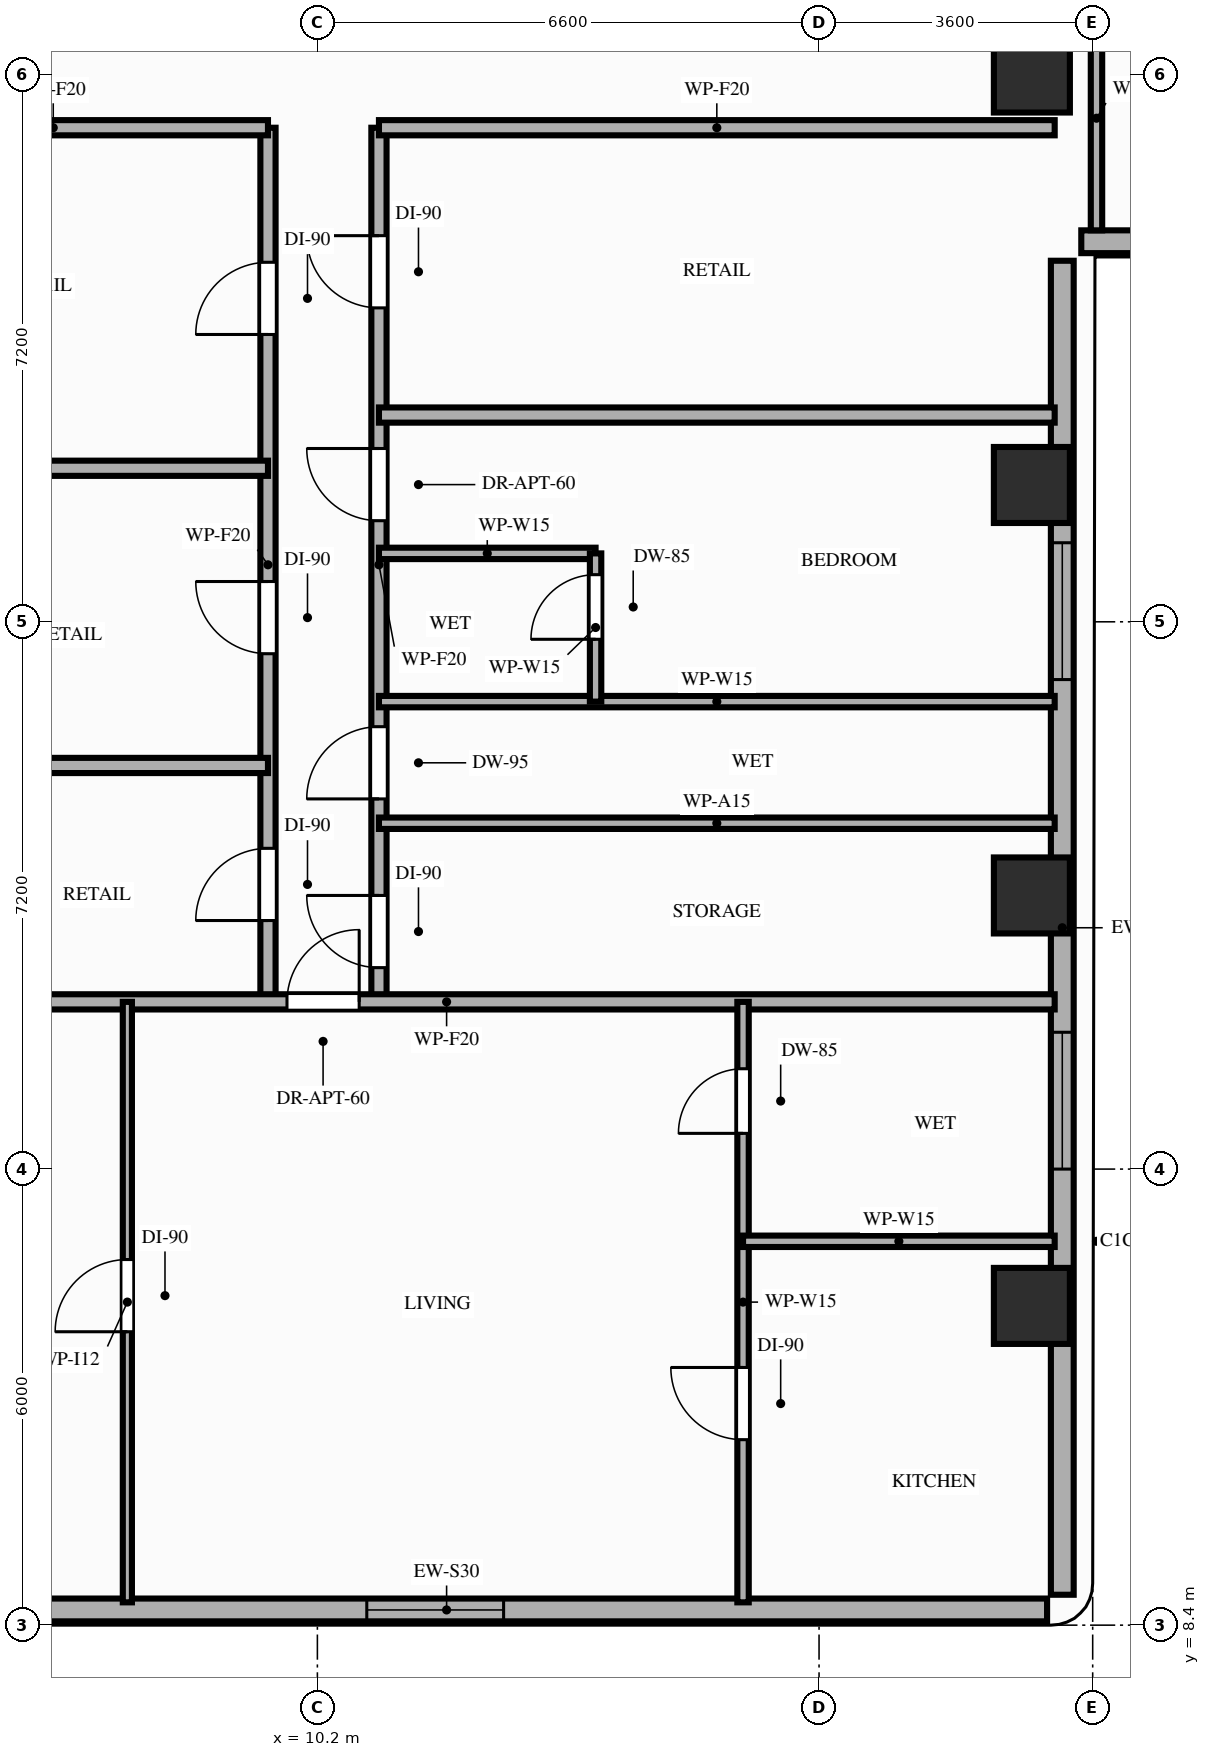
"""IFC4 building model, lengths in metres.
Left out: names, types, materials, properties, quantities, classifications, styles, units other than length and angle.
Written with IfcOpenShell. Run it as: python <this file> out.ifc"""

import sys

from ifc_helpers import new_model, si_unit, direction, frame, frame_2d, origin, origin_2d, place, context, subcontext, project, spatial, rectangle, extrude, element, fill, save


model = new_model("IFC4")
c1 = context("Model", 3, precision=1e-05, world=origin(), true_north=direction((0.0, 1.0)))
c2 = subcontext(c1, "Body", "Model", "MODEL_VIEW")
j1 = project(units=[si_unit("LENGTHUNIT", "METRE"), si_unit("PLANEANGLEUNIT", "RADIAN")], contexts=[c1])
p1 = place(None, origin())
s1 = spatial("IfcSite", under=j1, at=p1, CompositionType="ELEMENT")
p2 = place(p1, origin())
s2 = spatial("IfcBuilding", under=s1, at=p2, CompositionType="ELEMENT")
p3 = place(p2, frame((0.0, 0.0, 117.0)))
s3 = spatial("IfcBuildingStorey", under=s2, at=p3, CompositionType="ELEMENT", Elevation=117.0)
for number, where, z_axis, x_axis in (
    (1, (19.6, 12.6, 0.0), (0.0, 0.0, 1.0), (1.0, 0.0, 0.0)),
    (2, (19.6, 18.0, 0.0), (0.0, 0.0, 1.0), (1.0, 0.0, 0.0)),
    (3, (19.6, 23.4, 0.0), (0.0, 0.0, 1.0), (1.0, 0.0, 0.0)),
    (4, (19.6, 28.8, 0.0), (0.0, 0.0, 1.0), (1.0, 0.0, 0.0)),
):
    element("IfcColumn", number, at=place(p3, frame(where, z_axis=z_axis, x_axis=x_axis)), inside=s3, PredefinedType="COLUMN", context=c2, shape_type="SweptSolid", body=[
        extrude(rectangle(XDim=1.0, YDim=1.0, at=origin_2d()), origin(), (0.0, 0.0, 1.0), 3.2),
    ])
p4 = place(p3, frame((4.0, 8.6, 0.0), z_axis=(0.0, 0.0, 1.0), x_axis=(1.0, 0.0, 0.0)))
e5 = element("IfcWall", 5, at=p4, inside=s3, PredefinedType="STANDARD", context=c2, shape_type="SweptSolid", body=[
    extrude(rectangle(XDim=15.8, YDim=0.3, at=frame_2d((7.9, 0.0))), origin(), (0.0, 0.0, 1.0), 3.02),
])
p5 = place(p4, frame((6.85, 0.0, 0.85)))
e6 = element("IfcOpeningElement", 6, at=p5, cuts=e5, PredefinedType="OPENING", context=c2, shape_type="SweptSolid", body=[
    extrude(rectangle(XDim=1.8, YDim=1.75, at=frame_2d((0.9, 0.875))), frame((0.0, 0.16, 0.0), z_axis=(0.0, -1.0, 0.0), x_axis=(1.0, 0.0, 0.0)), (0.0, 0.0, 1.0), 0.32),
])
p6 = place(p3, frame((20.0, 8.8, 0.0), z_axis=(0.0, 0.0, 1.0), x_axis=(0.0, 1.0, 0.0)))
e7 = element("IfcWall", 7, at=p6, inside=s3, PredefinedType="STANDARD", context=c2, shape_type="SweptSolid", body=[
    extrude(rectangle(XDim=17.55, YDim=0.3, at=frame_2d((8.775, 0.0))), origin(), (0.0, 0.0, 1.0), 2.41),
])
p7 = place(p6, frame((12.04, 0.0, 0.85)))
e8 = element("IfcOpeningElement", 8, at=p7, cuts=e7, PredefinedType="OPENING", context=c2, shape_type="SweptSolid", body=[
    extrude(rectangle(XDim=1.8, YDim=1.31, at=frame_2d((0.9, 0.655))), frame((0.0, 0.16, 0.0), z_axis=(0.0, -1.0, 0.0), x_axis=(1.0, 0.0, 0.0)), (0.0, 0.0, 1.0), 0.32),
])
p8 = place(p6, frame((5.6, 0.0, 0.85)))
e9 = element("IfcOpeningElement", 9, at=p8, cuts=e7, PredefinedType="OPENING", context=c2, shape_type="SweptSolid", body=[
    extrude(rectangle(XDim=1.8, YDim=1.31, at=frame_2d((0.9, 0.655))), frame((0.0, 0.16, 0.0), z_axis=(0.0, -1.0, 0.0), x_axis=(1.0, 0.0, 0.0)), (0.0, 0.0, 1.0), 0.32),
])
p9 = place(p3, frame((20.25, 26.6, 0.0), z_axis=(0.0, 0.0, 1.0), x_axis=(1.0, 0.0, 0.0)))
e10 = element("IfcWall", 10, at=p9, inside=s3, PredefinedType="STANDARD", context=c2, shape_type="SweptSolid", body=[
    extrude(rectangle(XDim=26.15, YDim=0.3, at=frame_2d((13.075, 0.0))), origin(), (0.0, 0.0, 1.0), 2.7),
])
p10 = place(p9, frame((8.0, 0.0, 0.0)))
e11 = element("IfcOpeningElement", 11, at=p10, cuts=e10, PredefinedType="OPENING", context=c2, shape_type="SweptSolid", body=[
    extrude(rectangle(XDim=1.3, YDim=2.08, at=frame_2d((0.65, 1.04))), frame((0.0, 0.16, 0.0), z_axis=(0.0, -1.0, 0.0), x_axis=(1.0, 0.0, 0.0)), (0.0, 0.0, 1.0), 0.32),
])
p11 = place(p9, frame((22.5, 0.0, 0.0)))
e12 = element("IfcOpeningElement", 12, at=p11, cuts=e10, PredefinedType="OPENING", context=c2, shape_type="SweptSolid", body=[
    extrude(rectangle(XDim=1.3, YDim=2.08, at=frame_2d((0.65, 1.04))), frame((0.0, 0.16, 0.0), z_axis=(0.0, -1.0, 0.0), x_axis=(1.0, 0.0, 0.0)), (0.0, 0.0, 1.0), 0.32),
])
p12 = place(p9, frame((2.25, 0.0, 0.85)))
e13 = element("IfcOpeningElement", 13, at=p12, cuts=e10, PredefinedType="OPENING", context=c2, shape_type="SweptSolid", body=[
    extrude(rectangle(XDim=1.8, YDim=1.6, at=frame_2d((0.9, 0.8))), frame((0.0, 0.16, 0.0), z_axis=(0.0, -1.0, 0.0), x_axis=(1.0, 0.0, 0.0)), (0.0, 0.0, 1.0), 0.32),
])
p13 = place(p3, frame((9.55, 16.6, 0.0), z_axis=(0.0, 0.0, 1.0), x_axis=(0.0, 1.0, 0.0)))
e14 = element("IfcWall", 14, at=p13, inside=s3, PredefinedType="PARTITIONING", context=c2, shape_type="SweptSolid", body=[
    extrude(rectangle(XDim=11.5, YDim=0.2, at=frame_2d((5.75, 0.0))), origin(), (0.0, 0.0, 1.0), 2.41),
])
p14 = place(p13, frame((1.07, 0.0, 0.0)))
e15 = element("IfcOpeningElement", 15, at=p14, cuts=e14, PredefinedType="OPENING", context=c2, shape_type="SweptSolid", body=[
    extrude(rectangle(XDim=0.95, YDim=2.15, at=frame_2d((0.475, 1.075))), frame((0.0, 0.11, 0.0), z_axis=(0.0, -1.0, 0.0), x_axis=(1.0, 0.0, 0.0)), (0.0, 0.0, 1.0), 0.22),
])
p15 = place(p13, frame((4.58, 0.0, 0.0)))
e16 = element("IfcOpeningElement", 16, at=p15, cuts=e14, PredefinedType="OPENING", context=c2, shape_type="SweptSolid", body=[
    extrude(rectangle(XDim=0.95, YDim=2.15, at=frame_2d((0.475, 1.075))), frame((0.0, 0.11, 0.0), z_axis=(0.0, -1.0, 0.0), x_axis=(1.0, 0.0, 0.0)), (0.0, 0.0, 1.0), 0.22),
])
p16 = place(p13, frame((8.78, 0.0, 0.0)))
e17 = element("IfcOpeningElement", 17, at=p16, cuts=e14, PredefinedType="OPENING", context=c2, shape_type="SweptSolid", body=[
    extrude(rectangle(XDim=0.95, YDim=2.15, at=frame_2d((0.475, 1.075))), frame((0.0, 0.11, 0.0), z_axis=(0.0, -1.0, 0.0), x_axis=(1.0, 0.0, 0.0)), (0.0, 0.0, 1.0), 0.22),
])
p17 = place(p3, frame((11.01, 16.6, 0.0), z_axis=(0.0, 0.0, 1.0), x_axis=(0.0, 1.0, 0.0)))
e18 = element("IfcWall", 18, at=p17, inside=s3, PredefinedType="PARTITIONING", context=c2, shape_type="SweptSolid", body=[
    extrude(rectangle(XDim=11.5, YDim=0.2, at=frame_2d((5.75, 0.0))), origin(), (0.0, 0.0, 1.0), 2.41),
])
p18 = place(p17, frame((0.45, 0.0, 0.0)))
e19 = element("IfcOpeningElement", 19, at=p18, cuts=e18, PredefinedType="OPENING", context=c2, shape_type="SweptSolid", body=[
    extrude(rectangle(XDim=0.95, YDim=2.15, at=frame_2d((0.475, 1.075))), frame((0.0, 0.11, 0.0), z_axis=(0.0, -1.0, 0.0), x_axis=(1.0, 0.0, 0.0)), (0.0, 0.0, 1.0), 0.22),
])
p19 = place(p17, frame((2.67, 0.0, 0.0)))
e20 = element("IfcOpeningElement", 20, at=p19, cuts=e18, PredefinedType="OPENING", context=c2, shape_type="SweptSolid", body=[
    extrude(rectangle(XDim=0.95, YDim=2.1, at=frame_2d((0.475, 1.05))), frame((0.0, 0.11, 0.0), z_axis=(0.0, -1.0, 0.0), x_axis=(1.0, 0.0, 0.0)), (0.0, 0.0, 1.0), 0.22),
])
p20 = place(p17, frame((9.13, 0.0, 0.0)))
e21 = element("IfcOpeningElement", 21, at=p20, cuts=e18, PredefinedType="OPENING", context=c2, shape_type="SweptSolid", body=[
    extrude(rectangle(XDim=0.95, YDim=2.15, at=frame_2d((0.475, 1.075))), frame((0.0, 0.11, 0.0), z_axis=(0.0, -1.0, 0.0), x_axis=(1.0, 0.0, 0.0)), (0.0, 0.0, 1.0), 0.22),
])
p21 = place(p17, frame((6.33, 0.0, 0.0)))
e22 = element("IfcOpeningElement", 22, at=p21, cuts=e18, PredefinedType="OPENING", context=c2, shape_type="SweptSolid", body=[
    extrude(rectangle(XDim=0.95, YDim=2.15, at=frame_2d((0.475, 1.075))), frame((0.0, 0.11, 0.0), z_axis=(0.0, -1.0, 0.0), x_axis=(1.0, 0.0, 0.0)), (0.0, 0.0, 1.0), 0.22),
])
p22 = place(p3, frame((3.9, 16.6, 0.0), z_axis=(0.0, 0.0, 1.0), x_axis=(1.0, 0.0, 0.0)))
e23 = element("IfcWall", 23, at=p22, inside=s3, PredefinedType="PARTITIONING", context=c2, shape_type="SweptSolid", body=[
    extrude(rectangle(XDim=16.0, YDim=0.2, at=frame_2d((8.0, 0.0))), origin(), (0.0, 0.0, 1.0), 2.41),
])
p23 = place(p22, frame((5.9, 0.0, 0.0)))
e24 = element("IfcOpeningElement", 24, at=p23, cuts=e23, PredefinedType="OPENING", context=c2, shape_type="SweptSolid", body=[
    extrude(rectangle(XDim=0.95, YDim=2.15, at=frame_2d((0.475, 1.075))), frame((0.0, 0.11, 0.0), z_axis=(0.0, -1.0, 0.0), x_axis=(1.0, 0.0, 0.0)), (0.0, 0.0, 1.0), 0.22),
])
p24 = place(p3, frame((3.9, 28.1, 0.0), z_axis=(0.0, 0.0, 1.0), x_axis=(1.0, 0.0, 0.0)))
e25 = element("IfcWall", 25, at=p24, inside=s3, PredefinedType="PARTITIONING", context=c2, shape_type="SweptSolid", body=[
    extrude(rectangle(XDim=5.65, YDim=0.2, at=frame_2d((2.825, 0.0))), origin(), (0.0, 0.0, 1.0), 2.41),
])
p25 = place(p3, frame((11.01, 28.1, 0.0), z_axis=(0.0, 0.0, 1.0), x_axis=(1.0, 0.0, 0.0)))
e26 = element("IfcWall", 26, at=p25, inside=s3, PredefinedType="PARTITIONING", context=c2, shape_type="SweptSolid", body=[
    extrude(rectangle(XDim=8.89, YDim=0.2, at=frame_2d((4.445, 0.0))), origin(), (0.0, 0.0, 1.0), 2.41),
])
p26 = place(p3, frame((20.45, 26.75, 0.0), z_axis=(0.0, 0.0, 1.0), x_axis=(0.0, 1.0, 0.0)))
e27 = element("IfcWall", 27, at=p26, inside=s3, PredefinedType="PARTITIONING", context=c2, shape_type="SweptSolid", body=[
    extrude(rectangle(XDim=2.95, YDim=0.15, at=frame_2d((1.475, 0.0))), origin(), (0.0, 0.0, 1.0), 2.41),
])
for number, where, z_axis, x_axis in (
    (28, (3.9, 19.71, 0.0), (0.0, 0.0, 1.0), (1.0, 0.0, 0.0)),
    (29, (3.9, 23.62, 0.0), (0.0, 0.0, 1.0), (1.0, 0.0, 0.0)),
):
    element("IfcWall", number, at=place(p3, frame(where, z_axis=z_axis, x_axis=x_axis)), inside=s3, PredefinedType="PARTITIONING", context=c2, shape_type="SweptSolid", body=[
        extrude(rectangle(XDim=5.65, YDim=0.2, at=frame_2d((2.825, 0.0))), origin(), (0.0, 0.0, 1.0), 2.41),
    ])
p27 = place(p3, frame((7.7, 8.7, 0.0), z_axis=(0.0, 0.0, 1.0), x_axis=(0.0, 1.0, 0.0)))
e30 = element("IfcWall", 30, at=p27, inside=s3, PredefinedType="PARTITIONING", context=c2, shape_type="SweptSolid", body=[
    extrude(rectangle(XDim=7.9, YDim=0.12, at=frame_2d((3.95, 0.0))), origin(), (0.0, 0.0, 1.0), 2.41),
])
p28 = place(p27, frame((3.56, 0.0, 0.0)))
e31 = element("IfcOpeningElement", 31, at=p28, cuts=e30, PredefinedType="OPENING", context=c2, shape_type="SweptSolid", body=[
    extrude(rectangle(XDim=0.95, YDim=2.15, at=frame_2d((0.475, 1.075))), frame((0.0, 0.07, 0.0), z_axis=(0.0, -1.0, 0.0), x_axis=(1.0, 0.0, 0.0)), (0.0, 0.0, 1.0), 0.14),
])
p29 = place(p3, frame((15.8, 8.7, 0.0), z_axis=(0.0, 0.0, 1.0), x_axis=(0.0, 1.0, 0.0)))
e32 = element("IfcWall", 32, at=p29, inside=s3, PredefinedType="PARTITIONING", context=c2, shape_type="SweptSolid", body=[
    extrude(rectangle(XDim=7.9, YDim=0.15, at=frame_2d((3.95, 0.0))), origin(), (0.0, 0.0, 1.0), 2.41),
])
p30 = place(p29, frame((2.14, 0.0, 0.0)))
e33 = element("IfcOpeningElement", 33, at=p30, cuts=e32, PredefinedType="OPENING", context=c2, shape_type="SweptSolid", body=[
    extrude(rectangle(XDim=0.95, YDim=2.15, at=frame_2d((0.475, 1.075))), frame((0.0, 0.085, 0.0), z_axis=(0.0, -1.0, 0.0), x_axis=(1.0, 0.0, 0.0)), (0.0, 0.0, 1.0), 0.17),
])
p31 = place(p29, frame((6.17, 0.0, 0.0)))
e34 = element("IfcOpeningElement", 34, at=p31, cuts=e32, PredefinedType="OPENING", context=c2, shape_type="SweptSolid", body=[
    extrude(rectangle(XDim=0.85, YDim=2.1, at=frame_2d((0.425, 1.05))), frame((0.0, 0.085, 0.0), z_axis=(0.0, -1.0, 0.0), x_axis=(1.0, 0.0, 0.0)), (0.0, 0.0, 1.0), 0.17),
])
p32 = place(p3, frame((15.8, 13.45, 0.0), z_axis=(0.0, 0.0, 1.0), x_axis=(1.0, 0.0, 0.0)))
e35 = element("IfcWall", 35, at=p32, inside=s3, PredefinedType="PARTITIONING", context=c2, shape_type="SweptSolid", body=[
    extrude(rectangle(XDim=4.1, YDim=0.15, at=frame_2d((2.05, 0.0))), origin(), (0.0, 0.0, 1.0), 2.41),
])
for number, where, z_axis, x_axis in (
    (36, (11.01, 18.95, 0.0), (0.0, 0.0, 1.0), (1.0, 0.0, 0.0)),
    (37, (11.01, 20.55, 0.0), (0.0, 0.0, 1.0), (1.0, 0.0, 0.0)),
):
    element("IfcWall", number, at=place(p3, frame(where, z_axis=z_axis, x_axis=x_axis)), inside=s3, PredefinedType="PARTITIONING", context=c2, shape_type="SweptSolid", body=[
        extrude(rectangle(XDim=8.89, YDim=0.15, at=frame_2d((4.445, 0.0))), origin(), (0.0, 0.0, 1.0), 2.41),
    ])
p33 = place(p3, frame((11.01, 24.32, 0.0), z_axis=(0.0, 0.0, 1.0), x_axis=(1.0, 0.0, 0.0)))
e38 = element("IfcWall", 38, at=p33, inside=s3, PredefinedType="PARTITIONING", context=c2, shape_type="SweptSolid", body=[
    extrude(rectangle(XDim=8.89, YDim=0.2, at=frame_2d((4.445, 0.0))), origin(), (0.0, 0.0, 1.0), 2.41),
])
p34 = place(p3, frame((11.01, 22.5, 0.0), z_axis=(0.0, 0.0, 1.0), x_axis=(1.0, 0.0, 0.0)))
e39 = element("IfcWall", 39, at=p34, inside=s3, PredefinedType="PARTITIONING", context=c2, shape_type="SweptSolid", body=[
    extrude(rectangle(XDim=2.85, YDim=0.15, at=frame_2d((1.425, 0.0))), origin(), (0.0, 0.0, 1.0), 3.02),
])
p35 = place(p3, frame((13.86, 20.55, 0.0), z_axis=(0.0, 0.0, 1.0), x_axis=(0.0, 1.0, 0.0)))
e40 = element("IfcWall", 40, at=p35, inside=s3, PredefinedType="PARTITIONING", context=c2, shape_type="SweptSolid", body=[
    extrude(rectangle(XDim=1.95, YDim=0.15, at=frame_2d((0.975, 0.0))), origin(), (0.0, 0.0, 1.0), 2.6),
])
p36 = place(p35, frame((0.82, 0.0, 0.0)))
e41 = element("IfcOpeningElement", 41, at=p36, cuts=e40, PredefinedType="OPENING", context=c2, shape_type="SweptSolid", body=[
    extrude(rectangle(XDim=0.85, YDim=2.1, at=frame_2d((0.425, 1.05))), frame((0.0, 0.085, 0.0), z_axis=(0.0, -1.0, 0.0), x_axis=(1.0, 0.0, 0.0)), (0.0, 0.0, 1.0), 0.17),
])
p37 = place(p5, origin())
e42 = element("IfcWindow", 42, at=p37, inside=s3, PartitioningType="SINGLE_PANEL", PredefinedType="WINDOW", context=c2, shape_type="SweptSolid", body=[
    extrude(rectangle(XDim=1.8, YDim=1.75, at=frame_2d((0.9, 0.875))), frame((0.0, 0.03, 0.0), z_axis=(0.0, -1.0, 0.0), x_axis=(1.0, 0.0, 0.0)), (0.0, 0.0, 1.0), 0.06),
])
fill(e6, e42)
p38 = place(p7, origin())
e43 = element("IfcWindow", 43, at=p38, inside=s3, PartitioningType="SINGLE_PANEL", PredefinedType="WINDOW", context=c2, shape_type="SweptSolid", body=[
    extrude(rectangle(XDim=1.8, YDim=1.31, at=frame_2d((0.9, 0.655))), frame((0.0, 0.03, 0.0), z_axis=(0.0, -1.0, 0.0), x_axis=(1.0, 0.0, 0.0)), (0.0, 0.0, 1.0), 0.06),
])
fill(e8, e43)
p39 = place(p8, origin())
e44 = element("IfcWindow", 44, at=p39, inside=s3, PartitioningType="SINGLE_PANEL", PredefinedType="WINDOW", context=c2, shape_type="SweptSolid", body=[
    extrude(rectangle(XDim=1.8, YDim=1.31, at=frame_2d((0.9, 0.655))), frame((0.0, 0.03, 0.0), z_axis=(0.0, -1.0, 0.0), x_axis=(1.0, 0.0, 0.0)), (0.0, 0.0, 1.0), 0.06),
])
fill(e9, e44)
p40 = place(p14, origin())
e45 = element("IfcDoor", 45, at=p40, inside=s3, OperationType="SINGLE_SWING_LEFT", PredefinedType="DOOR", context=c2, shape_type="SweptSolid", body=[
    extrude(rectangle(XDim=0.95, YDim=2.15, at=frame_2d((0.475, 1.075))), frame((0.0, 0.025, 0.0), z_axis=(0.0, -1.0, 0.0), x_axis=(1.0, 0.0, 0.0)), (0.0, 0.0, 1.0), 0.05),
])
fill(e15, e45)
p41 = place(p15, origin())
e46 = element("IfcDoor", 46, at=p41, inside=s3, OperationType="SINGLE_SWING_RIGHT", PredefinedType="DOOR", context=c2, shape_type="SweptSolid", body=[
    extrude(rectangle(XDim=0.95, YDim=2.15, at=frame_2d((0.475, 1.075))), frame((0.0, 0.025, 0.0), z_axis=(0.0, -1.0, 0.0), x_axis=(1.0, 0.0, 0.0)), (0.0, 0.0, 1.0), 0.05),
])
fill(e16, e46)
p42 = place(p16, origin())
e47 = element("IfcDoor", 47, at=p42, inside=s3, OperationType="SINGLE_SWING_LEFT", PredefinedType="DOOR", context=c2, shape_type="SweptSolid", body=[
    extrude(rectangle(XDim=0.95, YDim=2.15, at=frame_2d((0.475, 1.075))), frame((0.0, 0.025, 0.0), z_axis=(0.0, -1.0, 0.0), x_axis=(1.0, 0.0, 0.0)), (0.0, 0.0, 1.0), 0.05),
])
fill(e17, e47)
p43 = place(p23, origin())
e48 = element("IfcDoor", 48, at=p43, inside=s3, OperationType="SINGLE_SWING_RIGHT", PredefinedType="DOOR", context=c2, shape_type="SweptSolid", body=[
    extrude(rectangle(XDim=0.95, YDim=2.15, at=frame_2d((0.475, 1.075))), frame((0.0, 0.025, 0.0), z_axis=(0.0, -1.0, 0.0), x_axis=(1.0, 0.0, 0.0)), (0.0, 0.0, 1.0), 0.05),
])
fill(e24, e48)
p44 = place(p28, origin())
e49 = element("IfcDoor", 49, at=p44, inside=s3, OperationType="SINGLE_SWING_LEFT", PredefinedType="DOOR", context=c2, shape_type="SweptSolid", body=[
    extrude(rectangle(XDim=0.95, YDim=2.15, at=frame_2d((0.475, 1.075))), frame((0.0, 0.025, 0.0), z_axis=(0.0, -1.0, 0.0), x_axis=(1.0, 0.0, 0.0)), (0.0, 0.0, 1.0), 0.05),
])
fill(e31, e49)
p45 = place(p30, origin())
e50 = element("IfcDoor", 50, at=p45, inside=s3, OperationType="SINGLE_SWING_RIGHT", PredefinedType="DOOR", context=c2, shape_type="SweptSolid", body=[
    extrude(rectangle(XDim=0.95, YDim=2.15, at=frame_2d((0.475, 1.075))), frame((0.0, 0.025, 0.0), z_axis=(0.0, -1.0, 0.0), x_axis=(1.0, 0.0, 0.0)), (0.0, 0.0, 1.0), 0.05),
])
fill(e33, e50)
p46 = place(p31, origin())
e51 = element("IfcDoor", 51, at=p46, inside=s3, OperationType="SINGLE_SWING_LEFT", PredefinedType="DOOR", context=c2, shape_type="SweptSolid", body=[
    extrude(rectangle(XDim=0.85, YDim=2.1, at=frame_2d((0.425, 1.05))), frame((0.0, 0.025, 0.0), z_axis=(0.0, -1.0, 0.0), x_axis=(1.0, 0.0, 0.0)), (0.0, 0.0, 1.0), 0.05),
])
fill(e34, e51)
p47 = place(p18, origin())
e52 = element("IfcDoor", 52, at=p47, inside=s3, OperationType="SINGLE_SWING_RIGHT", PredefinedType="DOOR", context=c2, shape_type="SweptSolid", body=[
    extrude(rectangle(XDim=0.95, YDim=2.15, at=frame_2d((0.475, 1.075))), frame((0.0, 0.025, 0.0), z_axis=(0.0, -1.0, 0.0), x_axis=(1.0, 0.0, 0.0)), (0.0, 0.0, 1.0), 0.05),
])
fill(e19, e52)
p48 = place(p19, origin())
e53 = element("IfcDoor", 53, at=p48, inside=s3, OperationType="SINGLE_SWING_LEFT", PredefinedType="DOOR", context=c2, shape_type="SweptSolid", body=[
    extrude(rectangle(XDim=0.95, YDim=2.1, at=frame_2d((0.475, 1.05))), frame((0.0, 0.025, 0.0), z_axis=(0.0, -1.0, 0.0), x_axis=(1.0, 0.0, 0.0)), (0.0, 0.0, 1.0), 0.05),
])
fill(e20, e53)
p49 = place(p20, origin())
e54 = element("IfcDoor", 54, at=p49, inside=s3, OperationType="SINGLE_SWING_RIGHT", PredefinedType="DOOR", context=c2, shape_type="SweptSolid", body=[
    extrude(rectangle(XDim=0.95, YDim=2.15, at=frame_2d((0.475, 1.075))), frame((0.0, 0.025, 0.0), z_axis=(0.0, -1.0, 0.0), x_axis=(1.0, 0.0, 0.0)), (0.0, 0.0, 1.0), 0.05),
])
fill(e21, e54)
p50 = place(p36, origin())
e55 = element("IfcDoor", 55, at=p50, inside=s3, OperationType="SINGLE_SWING_LEFT", PredefinedType="DOOR", context=c2, shape_type="SweptSolid", body=[
    extrude(rectangle(XDim=0.85, YDim=2.1, at=frame_2d((0.425, 1.05))), frame((0.0, 0.025, 0.0), z_axis=(0.0, -1.0, 0.0), x_axis=(1.0, 0.0, 0.0)), (0.0, 0.0, 1.0), 0.05),
])
fill(e41, e55)
p51 = place(p21, origin())
e56 = element("IfcDoor", 56, at=p51, inside=s3, OperationType="SINGLE_SWING_RIGHT", PredefinedType="DOOR", context=c2, shape_type="SweptSolid", body=[
    extrude(rectangle(XDim=0.95, YDim=2.15, at=frame_2d((0.475, 1.075))), frame((0.0, 0.025, 0.0), z_axis=(0.0, -1.0, 0.0), x_axis=(1.0, 0.0, 0.0)), (0.0, 0.0, 1.0), 0.05),
])
fill(e22, e56)
save(model, sys.argv[1])
